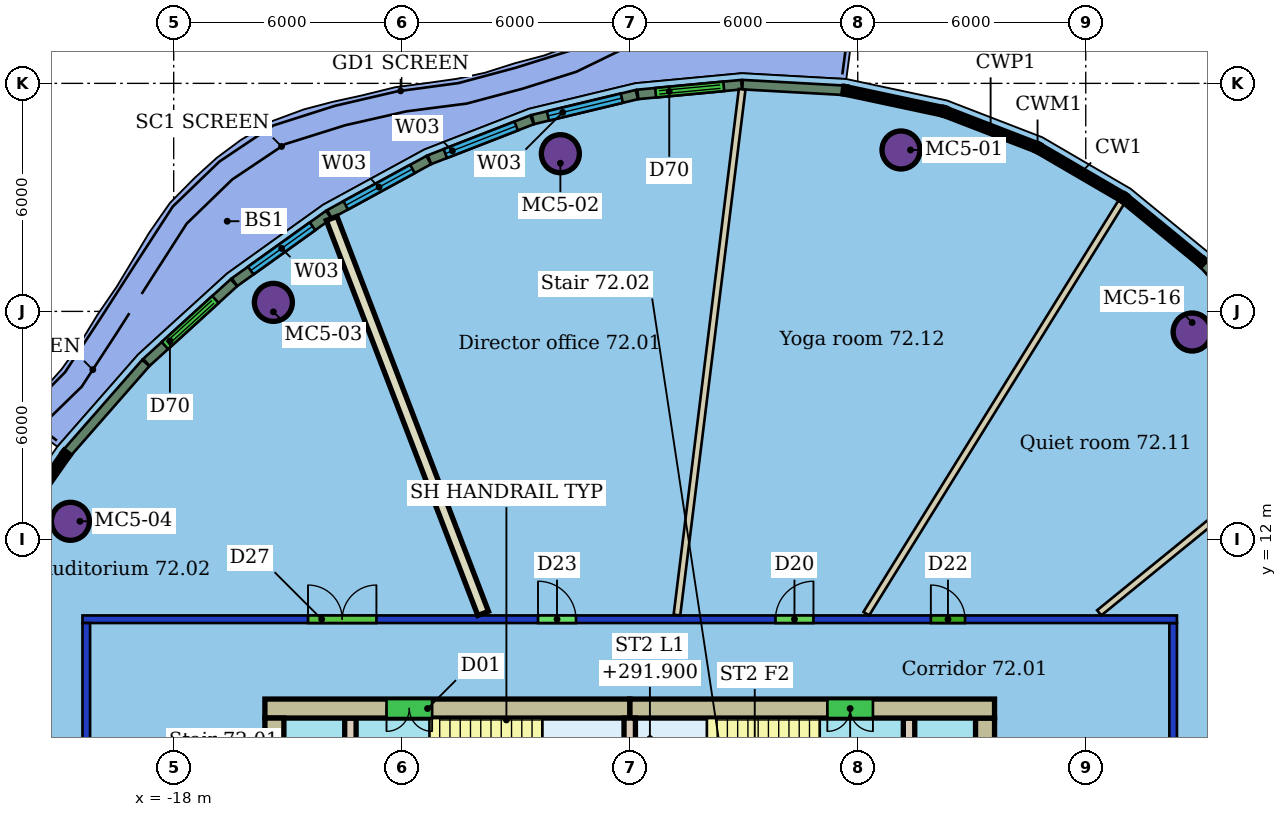
"""IFC4 building model, lengths in metres.
Left out: names, types, materials, properties, quantities, classifications, styles, units other than length and angle.
Written with IfcOpenShell. Run it as: python <this file> out.ifc"""

import sys

from ifc_helpers import new_model, si_unit, direction, frame, frame_2d, origin, origin_2d, place, context, subcontext, project, spatial, rectangle, hollow_circle, extrude, element, fill, save


model = new_model("IFC4")
c1 = context("Model", 3, precision=1e-05, world=origin(), true_north=direction((0.0, 1.0)))
c2 = subcontext(c1, "Body", "Model", "MODEL_VIEW")
j1 = project(units=[si_unit("LENGTHUNIT", "METRE"), si_unit("PLANEANGLEUNIT", "RADIAN")], contexts=[c1])
p1 = place(None, origin())
s1 = spatial("IfcSite", under=j1, at=p1, CompositionType="ELEMENT")
p2 = place(p1, origin())
s2 = spatial("IfcBuilding", under=s1, at=p2, CompositionType="ELEMENT")
p3 = place(p2, frame((0.0, 0.0, 290.1)))
s3 = spatial("IfcBuildingStorey", under=s2, at=p3, CompositionType="ELEMENT", Elevation=290.1)
for number, where, z_axis, x_axis in (
    (1, (1.138, 22.247, 0.0), (0.0, 0.0, 1.0), (1.0, 0.0, 0.0)),
    (2, (-7.825, 22.149, 0.0), (0.0, 0.0, 1.0), (1.0, 0.0, 0.0)),
    (3, (-15.377, 18.238, 0.0), (0.0, 0.0, 1.0), (1.0, 0.0, 0.0)),
    (4, (-20.718, 12.477, 0.0), (0.0, 0.0, 1.0), (1.0, 0.0, 0.0)),
    (5, (8.8, 17.457, 0.0), (0.0, 0.0, 1.0), (1.0, 0.0, 0.0)),
):
    element("IfcColumn", number, at=place(p3, frame(where, z_axis=z_axis, x_axis=x_axis)), inside=s3, PredefinedType="COLUMN", context=c2, shape_type="SweptSolid", body=[
        extrude(hollow_circle(Radius=0.5, WallThickness=0.04, at=origin_2d()), origin(), (0.0, 0.0, 1.0), 3.45),
    ])
p4 = place(p3, frame((-20.3, -9.8, 0.0), z_axis=(0.0, 0.0, 1.0), x_axis=(0.0, 1.0, 0.0)))
e6 = element("IfcWall", 6, at=p4, inside=s3, PredefinedType="PARTITIONING", context=c2, shape_type="SweptSolid", body=[
    extrude(rectangle(XDim=19.6, YDim=0.2, at=frame_2d((9.8, 0.0))), origin(), (0.0, 0.0, 1.0), 3.1),
])
p5 = place(p4, frame((8.396, 0.0, 0.0)))
e7 = element("IfcOpeningElement", 7, at=p5, cuts=e6, PredefinedType="OPENING", context=c2, shape_type="SweptSolid", body=[
    extrude(rectangle(XDim=1.5, YDim=2.1, at=frame_2d((0.75, 1.05))), frame((0.0, 0.11, 0.0), z_axis=(0.0, -1.0, 0.0), x_axis=(1.0, 0.0, 0.0)), (0.0, 0.0, 1.0), 0.22),
])
p6 = place(p4, frame((4.205, 0.0, 0.0)))
e8 = element("IfcOpeningElement", 8, at=p6, cuts=e6, PredefinedType="OPENING", context=c2, shape_type="SweptSolid", body=[
    extrude(rectangle(XDim=1.0, YDim=2.1, at=frame_2d((0.5, 1.05))), frame((0.0, 0.11, 0.0), z_axis=(0.0, -1.0, 0.0), x_axis=(1.0, 0.0, 0.0)), (0.0, 0.0, 1.0), 0.22),
])
p7 = place(p3, frame((-20.4, 9.9, 0.0), z_axis=(0.0, 0.0, 1.0), x_axis=(1.0, 0.0, 0.0)))
e9 = element("IfcWall", 9, at=p7, inside=s3, PredefinedType="PARTITIONING", context=c2, shape_type="SweptSolid", body=[
    extrude(rectangle(XDim=28.8, YDim=0.2, at=frame_2d((14.4, 0.0))), origin(), (0.0, 0.0, 1.0), 3.1),
])
p8 = place(p7, frame((11.987, 0.0, 0.0)))
e10 = element("IfcOpeningElement", 10, at=p8, cuts=e9, PredefinedType="OPENING", context=c2, shape_type="SweptSolid", body=[
    extrude(rectangle(XDim=1.0, YDim=2.4, at=frame_2d((0.5, 1.2))), frame((0.0, 0.11, 0.0), z_axis=(0.0, -1.0, 0.0), x_axis=(1.0, 0.0, 0.0)), (0.0, 0.0, 1.0), 0.22),
])
p9 = place(p7, frame((5.934, 0.0, 0.0)))
e11 = element("IfcOpeningElement", 11, at=p9, cuts=e9, PredefinedType="OPENING", context=c2, shape_type="SweptSolid", body=[
    extrude(rectangle(XDim=1.8, YDim=2.4, at=frame_2d((0.9, 1.2))), frame((0.0, 0.11, 0.0), z_axis=(0.0, -1.0, 0.0), x_axis=(1.0, 0.0, 0.0)), (0.0, 0.0, 1.0), 0.22),
])
p10 = place(p7, frame((22.324, 0.0, 0.0)))
e12 = element("IfcOpeningElement", 12, at=p10, cuts=e9, PredefinedType="OPENING", context=c2, shape_type="SweptSolid", body=[
    extrude(rectangle(XDim=0.9, YDim=2.1, at=frame_2d((0.45, 1.05))), frame((0.0, 0.11, 0.0), z_axis=(0.0, -1.0, 0.0), x_axis=(1.0, 0.0, 0.0)), (0.0, 0.0, 1.0), 0.22),
])
p11 = place(p7, frame((18.235, 0.0, 0.0)))
e13 = element("IfcOpeningElement", 13, at=p11, cuts=e9, PredefinedType="OPENING", context=c2, shape_type="SweptSolid", body=[
    extrude(rectangle(XDim=1.0, YDim=2.1, at=frame_2d((0.5, 1.05))), frame((0.0, 0.11, 0.0), z_axis=(0.0, -1.0, 0.0), x_axis=(1.0, 0.0, 0.0)), (0.0, 0.0, 1.0), 0.22),
])
p12 = place(p3, frame((8.3, 9.8, 0.0), z_axis=(0.0, 0.0, 1.0), x_axis=(0.0, -1.0, 0.0)))
e14 = element("IfcWall", 14, at=p12, inside=s3, PredefinedType="PARTITIONING", context=c2, shape_type="SweptSolid", body=[
    extrude(rectangle(XDim=19.6, YDim=0.2, at=frame_2d((9.8, 0.0))), origin(), (0.0, 0.0, 1.0), 3.1),
])
p13 = place(p12, frame((13.839, 0.0, 0.0)))
e15 = element("IfcOpeningElement", 15, at=p13, cuts=e14, PredefinedType="OPENING", context=c2, shape_type="SweptSolid", body=[
    extrude(rectangle(XDim=1.5, YDim=2.1, at=frame_2d((0.75, 1.05))), frame((0.0, 0.11, 0.0), z_axis=(0.0, -1.0, 0.0), x_axis=(1.0, 0.0, 0.0)), (0.0, 0.0, 1.0), 0.22),
])
p14 = place(p12, frame((8.55, 0.0, 0.0)))
e16 = element("IfcOpeningElement", 16, at=p14, cuts=e14, PredefinedType="OPENING", context=c2, shape_type="SweptSolid", body=[
    extrude(rectangle(XDim=0.9, YDim=2.1, at=frame_2d((0.45, 1.05))), frame((0.0, 0.11, 0.0), z_axis=(0.0, -1.0, 0.0), x_axis=(1.0, 0.0, 0.0)), (0.0, 0.0, 1.0), 0.22),
])
p15 = place(p12, frame((3.855, 0.0, 0.0)))
e17 = element("IfcOpeningElement", 17, at=p15, cuts=e14, PredefinedType="OPENING", context=c2, shape_type="SweptSolid", body=[
    extrude(rectangle(XDim=1.5, YDim=2.4, at=frame_2d((0.75, 1.2))), frame((0.0, 0.11, 0.0), z_axis=(0.0, -1.0, 0.0), x_axis=(1.0, 0.0, 0.0)), (0.0, 0.0, 1.0), 0.22),
])
p16 = place(p3, frame((-3.042, 23.842, 0.0), z_axis=(0.0, 0.0, 1.0), x_axis=(-0.123142143045, -0.99238904297, 0.0)))
e18 = element("IfcWall", 18, at=p16, inside=s3, PredefinedType="PARTITIONING", context=c2, shape_type="SweptSolid", body=[
    extrude(rectangle(XDim=13.938, YDim=0.175, at=frame_2d((6.969, 0.0))), origin(), (0.0, 0.0, 1.0), 3.45),
])
p17 = place(p3, frame((-13.844, 20.446, 0.0), z_axis=(0.0, 0.0, 1.0), x_axis=(0.358211704093, -0.933640388507, 0.0)))
e19 = element("IfcWall", 19, at=p17, inside=s3, PredefinedType="PARTITIONING", context=c2, shape_type="SweptSolid", body=[
    extrude(rectangle(XDim=11.13, YDim=0.3, at=frame_2d((5.565, 0.0))), origin(), (0.0, 0.0, 1.0), 3.45),
])
p18 = place(p3, frame((12.284, 14.9, 0.0), z_axis=(0.0, 0.0, 1.0), x_axis=(-0.775191568624, -0.631726231792, 0.0)))
e20 = element("IfcWall", 20, at=p18, inside=s3, PredefinedType="PARTITIONING", context=c2, shape_type="SweptSolid", body=[
    extrude(rectangle(XDim=7.649, YDim=0.175, at=frame_2d((3.825, 0.0))), origin(), (0.0, 0.0, 1.0), 3.45),
])
p19 = place(p3, frame((6.938, 20.878, 0.0), z_axis=(0.0, 0.0, 1.0), x_axis=(-0.526747010392, -0.850022109738, 0.0)))
e21 = element("IfcWall", 21, at=p19, inside=s3, PredefinedType="PARTITIONING", context=c2, shape_type="SweptSolid", body=[
    extrude(rectangle(XDim=12.743, YDim=0.175, at=frame_2d((6.371, 0.0))), origin(), (0.0, 0.0, 1.0), 3.45),
])
p20 = place(p3, frame((-0.396, 23.82, 0.0), z_axis=(0.0, 0.0, 1.0), x_axis=(-0.998463198624, 0.055418778352, 0.0)))
e22 = element("IfcWall", 22, at=p20, inside=s3, PredefinedType="SOLIDWALL", context=c2, shape_type="SweptSolid", body=[
    extrude(rectangle(XDim=2.639, YDim=0.25, at=frame_2d((1.319, 0.0))), origin(), (0.0, 0.0, 1.0), 3.15),
])
p21 = place(p3, frame((-3.057, 23.966, 0.0), z_axis=(0.0, 0.0, 1.0), x_axis=(-0.995626981475, -0.093417952019, 0.0)))
e23 = element("IfcWall", 23, at=p21, inside=s3, PredefinedType="SOLIDWALL", context=c2, shape_type="SweptSolid", body=[
    extrude(rectangle(XDim=2.741, YDim=0.25, at=frame_2d((1.371, 0.0))), origin(), (0.0, 0.0, 1.0), 3.15),
])
p22 = place(p21, frame((0.471, 0.0, 0.0)))
e24 = element("IfcOpeningElement", 24, at=p22, cuts=e23, PredefinedType="OPENING", context=c2, shape_type="SweptSolid", body=[
    extrude(rectangle(XDim=1.8, YDim=2.4, at=frame_2d((0.9, 1.2))), frame((0.0, 0.135, 0.0), z_axis=(0.0, -1.0, 0.0), x_axis=(1.0, 0.0, 0.0)), (0.0, 0.0, 1.0), 0.27),
])
p23 = place(p3, frame((-5.812, 23.706, 0.0), z_axis=(0.0, 0.0, 1.0), x_axis=(-0.972306924108, -0.233707606491, 0.0)))
e25 = element("IfcWall", 25, at=p23, inside=s3, PredefinedType="SOLIDWALL", context=c2, shape_type="SweptSolid", body=[
    extrude(rectangle(XDim=2.814, YDim=0.25, at=frame_2d((1.407, 0.0))), origin(), (0.0, 0.0, 1.0), 3.15),
])
p24 = place(p23, frame((0.407, 0.0, 0.9)))
e26 = element("IfcOpeningElement", 26, at=p24, cuts=e25, PredefinedType="OPENING", context=c2, shape_type="SweptSolid", body=[
    extrude(rectangle(XDim=2.0, YDim=2.1, at=frame_2d((1.0, 1.05))), frame((0.0, 0.135, 0.0), z_axis=(0.0, -1.0, 0.0), x_axis=(1.0, 0.0, 0.0)), (0.0, 0.0, 1.0), 0.27),
])
p25 = place(p3, frame((-8.572, 23.041, 0.0), z_axis=(0.0, 0.0, 1.0), x_axis=(-0.931927060947, -0.362645768035, 0.0)))
e27 = element("IfcWall", 27, at=p25, inside=s3, PredefinedType="SOLIDWALL", context=c2, shape_type="SweptSolid", body=[
    extrude(rectangle(XDim=2.894, YDim=0.25, at=frame_2d((1.447, 0.0))), origin(), (0.0, 0.0, 1.0), 3.15),
])
p26 = place(p25, frame((0.447, 0.0, 0.9)))
e28 = element("IfcOpeningElement", 28, at=p26, cuts=e27, PredefinedType="OPENING", context=c2, shape_type="SweptSolid", body=[
    extrude(rectangle(XDim=2.0, YDim=2.1, at=frame_2d((1.0, 1.05))), frame((0.0, 0.135, 0.0), z_axis=(0.0, -1.0, 0.0), x_axis=(1.0, 0.0, 0.0)), (0.0, 0.0, 1.0), 0.27),
])
p27 = place(p3, frame((-11.291, 21.981, 0.0), z_axis=(0.0, 0.0, 1.0), x_axis=(-0.877823384271, -0.478984452802, 0.0)))
e29 = element("IfcWall", 29, at=p27, inside=s3, PredefinedType="SOLIDWALL", context=c2, shape_type="SweptSolid", body=[
    extrude(rectangle(XDim=2.973, YDim=0.25, at=frame_2d((1.487, 0.0))), origin(), (0.0, 0.0, 1.0), 3.15),
])
p28 = place(p27, frame((0.487, 0.0, 0.9)))
e30 = element("IfcOpeningElement", 30, at=p28, cuts=e29, PredefinedType="OPENING", context=c2, shape_type="SweptSolid", body=[
    extrude(rectangle(XDim=2.0, YDim=2.1, at=frame_2d((1.0, 1.05))), frame((0.0, 0.135, 0.0), z_axis=(0.0, -1.0, 0.0), x_axis=(1.0, 0.0, 0.0)), (0.0, 0.0, 1.0), 0.27),
])
p29 = place(p3, frame((-13.92, 20.544, 0.0), z_axis=(0.0, 0.0, 1.0), x_axis=(-0.812910032744, -0.582389284469, 0.0)))
e31 = element("IfcWall", 31, at=p29, inside=s3, PredefinedType="SOLIDWALL", context=c2, shape_type="SweptSolid", body=[
    extrude(rectangle(XDim=3.048, YDim=0.25, at=frame_2d((1.524, 0.0))), origin(), (0.0, 0.0, 1.0), 3.15),
])
p30 = place(p29, frame((0.524, 0.0, 0.9)))
e32 = element("IfcOpeningElement", 32, at=p30, cuts=e31, PredefinedType="OPENING", context=c2, shape_type="SweptSolid", body=[
    extrude(rectangle(XDim=2.0, YDim=2.1, at=frame_2d((1.0, 1.05))), frame((0.0, 0.135, 0.0), z_axis=(0.0, -1.0, 0.0), x_axis=(1.0, 0.0, 0.0)), (0.0, 0.0, 1.0), 0.27),
])
p31 = place(p3, frame((-16.416, 18.755, 0.0), z_axis=(0.0, 0.0, 1.0), x_axis=(-0.739421840392, -0.673242409502, 0.0)))
e33 = element("IfcWall", 33, at=p31, inside=s3, PredefinedType="SOLIDWALL", context=c2, shape_type="SweptSolid", body=[
    extrude(rectangle(XDim=3.114, YDim=0.25, at=frame_2d((1.557, 0.0))), origin(), (0.0, 0.0, 1.0), 3.15),
])
p32 = place(p31, frame((0.657, 0.0, 0.0)))
e34 = element("IfcOpeningElement", 34, at=p32, cuts=e33, PredefinedType="OPENING", context=c2, shape_type="SweptSolid", body=[
    extrude(rectangle(XDim=1.8, YDim=2.4, at=frame_2d((0.9, 1.2))), frame((0.0, 0.135, 0.0), z_axis=(0.0, -1.0, 0.0), x_axis=(1.0, 0.0, 0.0)), (0.0, 0.0, 1.0), 0.27),
])
p33 = place(p3, frame((-18.733, 16.643, 0.0), z_axis=(0.0, 0.0, 1.0), x_axis=(-0.658963977512, -0.752174498598, 0.0)))
e35 = element("IfcWall", 35, at=p33, inside=s3, PredefinedType="SOLIDWALL", context=c2, shape_type="SweptSolid", body=[
    extrude(rectangle(XDim=3.122, YDim=0.25, at=frame_2d((1.561, 0.0))), origin(), (0.0, 0.0, 1.0), 3.15),
])
p34 = place(p3, frame((10.866, 17.285, 0.0), z_axis=(0.0, 0.0, 1.0), x_axis=(-0.666789450608, 0.745246152997, 0.0)))
e36 = element("IfcWall", 36, at=p34, inside=s3, PredefinedType="SOLIDWALL", context=c2, shape_type="SweptSolid", body=[
    extrude(rectangle(XDim=2.639, YDim=0.25, at=frame_2d((1.319, 0.0))), origin(), (0.0, 0.0, 1.0), 3.15),
])
p35 = place(p3, frame((3.6, 7.55, 0.0), z_axis=(0.0, 0.0, 1.0), x_axis=(-1.0, 0.0, 0.0)))
e37 = element("IfcWall", 37, at=p35, inside=s3, PredefinedType="SHEAR", context=c2, shape_type="SweptSolid", body=[
    extrude(rectangle(XDim=9.6, YDim=0.5, at=frame_2d((4.8, 0.0))), origin(), (0.0, 0.0, 1.0), 3.3),
])
p36 = place(p35, frame((3.2, 0.0, 0.0)))
e38 = element("IfcOpeningElement", 38, at=p36, cuts=e37, PredefinedType="OPENING", context=c2, shape_type="SweptSolid", body=[
    extrude(rectangle(XDim=1.2, YDim=2.1, at=frame_2d((0.6, 1.05))), frame((0.0, 0.26, 0.0), z_axis=(0.0, -1.0, 0.0), x_axis=(1.0, 0.0, 0.0)), (0.0, 0.0, 1.0), 0.52),
])
p37 = place(p3, frame((-6.0, 7.55, 0.0), z_axis=(0.0, 0.0, 1.0), x_axis=(-1.0, 0.0, 0.0)))
e39 = element("IfcWall", 39, at=p37, inside=s3, PredefinedType="SHEAR", context=c2, shape_type="SweptSolid", body=[
    extrude(rectangle(XDim=9.6, YDim=0.5, at=frame_2d((4.8, 0.0))), origin(), (0.0, 0.0, 1.0), 3.3),
])
p38 = place(p37, frame((5.2, 0.0, 0.0)))
e40 = element("IfcOpeningElement", 40, at=p38, cuts=e39, PredefinedType="OPENING", context=c2, shape_type="SweptSolid", body=[
    extrude(rectangle(XDim=1.2, YDim=2.1, at=frame_2d((0.6, 1.05))), frame((0.0, 0.26, 0.0), z_axis=(0.0, -1.0, 0.0), x_axis=(1.0, 0.0, 0.0)), (0.0, 0.0, 1.0), 0.52),
])
p39 = place(p3, frame((-15.35, 7.3, 0.0), z_axis=(0.0, 0.0, 1.0), x_axis=(0.0, -1.0, 0.0)))
e41 = element("IfcWall", 41, at=p39, inside=s3, PredefinedType="SHEAR", context=c2, shape_type="SweptSolid", body=[
    extrude(rectangle(XDim=14.6, YDim=0.5, at=frame_2d((7.3, 0.0))), origin(), (0.0, 0.0, 1.0), 3.3),
])
p40 = place(p39, frame((10.6, 0.0, 0.0)))
e42 = element("IfcOpeningElement", 42, at=p40, cuts=e41, PredefinedType="OPENING", context=c2, shape_type="SweptSolid", body=[
    extrude(rectangle(XDim=1.2, YDim=2.1, at=frame_2d((0.6, 1.05))), frame((0.0, 0.26, 0.0), z_axis=(0.0, -1.0, 0.0), x_axis=(1.0, 0.0, 0.0)), (0.0, 0.0, 1.0), 0.52),
])
p41 = place(p39, frame((2.8, 0.0, 0.0)))
e43 = element("IfcOpeningElement", 43, at=p41, cuts=e41, PredefinedType="OPENING", context=c2, shape_type="SweptSolid", body=[
    extrude(rectangle(XDim=1.2, YDim=2.1, at=frame_2d((0.6, 1.05))), frame((0.0, 0.26, 0.0), z_axis=(0.0, -1.0, 0.0), x_axis=(1.0, 0.0, 0.0)), (0.0, 0.0, 1.0), 0.52),
])
p42 = place(p3, frame((3.35, -7.3, 0.0), z_axis=(0.0, 0.0, 1.0), x_axis=(0.0, 1.0, 0.0)))
e44 = element("IfcWall", 44, at=p42, inside=s3, PredefinedType="SHEAR", context=c2, shape_type="SweptSolid", body=[
    extrude(rectangle(XDim=14.6, YDim=0.5, at=frame_2d((7.3, 0.0))), origin(), (0.0, 0.0, 1.0), 3.3),
])
p43 = place(p42, frame((2.8, 0.0, 0.0)))
e45 = element("IfcOpeningElement", 45, at=p43, cuts=e44, PredefinedType="OPENING", context=c2, shape_type="SweptSolid", body=[
    extrude(rectangle(XDim=1.2, YDim=2.1, at=frame_2d((0.6, 1.05))), frame((0.0, 0.26, 0.0), z_axis=(0.0, -1.0, 0.0), x_axis=(1.0, 0.0, 0.0)), (0.0, 0.0, 1.0), 0.52),
])
p44 = place(p42, frame((10.6, 0.0, 0.0)))
e46 = element("IfcOpeningElement", 46, at=p44, cuts=e44, PredefinedType="OPENING", context=c2, shape_type="SweptSolid", body=[
    extrude(rectangle(XDim=1.2, YDim=2.1, at=frame_2d((0.6, 1.05))), frame((0.0, 0.26, 0.0), z_axis=(0.0, -1.0, 0.0), x_axis=(1.0, 0.0, 0.0)), (0.0, 0.0, 1.0), 0.52),
])
p45 = place(p3, frame((-13.35, 7.3, 0.0), z_axis=(0.0, 0.0, 1.0), x_axis=(0.0, -1.0, 0.0)))
e47 = element("IfcWall", 47, at=p45, inside=s3, PredefinedType="SHEAR", context=c2, shape_type="SweptSolid", body=[
    extrude(rectangle(XDim=14.6, YDim=0.3, at=frame_2d((7.3, 0.0))), origin(), (0.0, 0.0, 1.0), 3.3),
])
p46 = place(p45, frame((6.55, 0.0, 0.0)))
e48 = element("IfcOpeningElement", 48, at=p46, cuts=e47, PredefinedType="OPENING", context=c2, shape_type="SweptSolid", body=[
    extrude(rectangle(XDim=1.5, YDim=2.1, at=frame_2d((0.75, 1.05))), frame((0.0, 0.16, 0.0), z_axis=(0.0, -1.0, 0.0), x_axis=(1.0, 0.0, 0.0)), (0.0, 0.0, 1.0), 0.32),
])
p47 = place(p3, frame((1.35, -7.3, 0.0), z_axis=(0.0, 0.0, 1.0), x_axis=(0.0, 1.0, 0.0)))
e49 = element("IfcWall", 49, at=p47, inside=s3, PredefinedType="SHEAR", context=c2, shape_type="SweptSolid", body=[
    extrude(rectangle(XDim=14.6, YDim=0.3, at=frame_2d((7.3, 0.0))), origin(), (0.0, 0.0, 1.0), 3.3),
])
p48 = place(p47, frame((1.21, 0.0, 0.0)))
e50 = element("IfcOpeningElement", 50, at=p48, cuts=e49, PredefinedType="OPENING", context=c2, shape_type="SweptSolid", body=[
    extrude(rectangle(XDim=1.0, YDim=2.1, at=frame_2d((0.5, 1.05))), frame((0.0, 0.16, 0.0), z_axis=(0.0, -1.0, 0.0), x_axis=(1.0, 0.0, 0.0)), (0.0, 0.0, 1.0), 0.32),
])
p49 = place(p47, frame((6.55, 0.0, 0.0)))
e51 = element("IfcOpeningElement", 51, at=p49, cuts=e49, PredefinedType="OPENING", context=c2, shape_type="SweptSolid", body=[
    extrude(rectangle(XDim=1.5, YDim=2.1, at=frame_2d((0.75, 1.05))), frame((0.0, 0.16, 0.0), z_axis=(0.0, -1.0, 0.0), x_axis=(1.0, 0.0, 0.0)), (0.0, 0.0, 1.0), 0.32),
])
p50 = place(p3, frame((-6.0, 3.88, 0.0), z_axis=(0.0, 0.0, 1.0), x_axis=(0.0, 1.0, 0.0)))
e52 = element("IfcWall", 52, at=p50, inside=s3, PredefinedType="SHEAR", context=c2, shape_type="SweptSolid", body=[
    extrude(rectangle(XDim=3.42, YDim=0.3, at=frame_2d((1.71, 0.0))), origin(), (0.0, 0.0, 1.0), 3.3),
])
p51 = place(p8, origin())
e53 = element("IfcDoor", 53, at=p51, inside=s3, OperationType="SINGLE_SWING_LEFT", PredefinedType="DOOR", context=c2, shape_type="SweptSolid", body=[
    extrude(rectangle(XDim=1.0, YDim=2.4, at=frame_2d((0.5, 1.2))), frame((0.0, 0.025, 0.0), z_axis=(0.0, -1.0, 0.0), x_axis=(1.0, 0.0, 0.0)), (0.0, 0.0, 1.0), 0.05),
])
fill(e10, e53)
p52 = place(p9, origin())
e54 = element("IfcDoor", 54, at=p52, inside=s3, OperationType="DOUBLE_DOOR_SINGLE_SWING", PredefinedType="DOOR", context=c2, shape_type="SweptSolid", body=[
    extrude(rectangle(XDim=1.8, YDim=2.4, at=frame_2d((0.9, 1.2))), frame((0.0, 0.025, 0.0), z_axis=(0.0, -1.0, 0.0), x_axis=(1.0, 0.0, 0.0)), (0.0, 0.0, 1.0), 0.05),
])
fill(e11, e54)
p53 = place(p10, origin())
e55 = element("IfcDoor", 55, at=p53, inside=s3, OperationType="SINGLE_SWING_LEFT", PredefinedType="DOOR", context=c2, shape_type="SweptSolid", body=[
    extrude(rectangle(XDim=0.9, YDim=2.1, at=frame_2d((0.45, 1.05))), frame((0.0, 0.025, 0.0), z_axis=(0.0, -1.0, 0.0), x_axis=(1.0, 0.0, 0.0)), (0.0, 0.0, 1.0), 0.05),
])
fill(e12, e55)
p54 = place(p11, origin())
e56 = element("IfcDoor", 56, at=p54, inside=s3, OperationType="SINGLE_SWING_RIGHT", PredefinedType="DOOR", context=c2, shape_type="SweptSolid", body=[
    extrude(rectangle(XDim=1.0, YDim=2.1, at=frame_2d((0.5, 1.05))), frame((0.0, 0.025, 0.0), z_axis=(0.0, -1.0, 0.0), x_axis=(1.0, 0.0, 0.0)), (0.0, 0.0, 1.0), 0.05),
])
fill(e13, e56)
p55 = place(p22, origin())
e57 = element("IfcDoor", 57, at=p55, inside=s3, OperationType="DOUBLE_DOOR_SLIDING", PredefinedType="DOOR", context=c2, shape_type="SweptSolid", body=[
    extrude(rectangle(XDim=1.8, YDim=2.4, at=frame_2d((0.9, 1.2))), frame((0.0, 0.025, 0.0), z_axis=(0.0, -1.0, 0.0), x_axis=(1.0, 0.0, 0.0)), (0.0, 0.0, 1.0), 0.05),
])
fill(e24, e57)
p56 = place(p24, origin())
e58 = element("IfcWindow", 58, at=p56, inside=s3, PartitioningType="SINGLE_PANEL", PredefinedType="WINDOW", context=c2, shape_type="SweptSolid", body=[
    extrude(rectangle(XDim=2.0, YDim=2.1, at=frame_2d((1.0, 1.05))), frame((0.0, 0.03, 0.0), z_axis=(0.0, -1.0, 0.0), x_axis=(1.0, 0.0, 0.0)), (0.0, 0.0, 1.0), 0.06),
])
fill(e26, e58)
p57 = place(p26, origin())
e59 = element("IfcWindow", 59, at=p57, inside=s3, PartitioningType="SINGLE_PANEL", PredefinedType="WINDOW", context=c2, shape_type="SweptSolid", body=[
    extrude(rectangle(XDim=2.0, YDim=2.1, at=frame_2d((1.0, 1.05))), frame((0.0, 0.03, 0.0), z_axis=(0.0, -1.0, 0.0), x_axis=(1.0, 0.0, 0.0)), (0.0, 0.0, 1.0), 0.06),
])
fill(e28, e59)
p58 = place(p28, origin())
e60 = element("IfcWindow", 60, at=p58, inside=s3, PartitioningType="SINGLE_PANEL", PredefinedType="WINDOW", context=c2, shape_type="SweptSolid", body=[
    extrude(rectangle(XDim=2.0, YDim=2.1, at=frame_2d((1.0, 1.05))), frame((0.0, 0.03, 0.0), z_axis=(0.0, -1.0, 0.0), x_axis=(1.0, 0.0, 0.0)), (0.0, 0.0, 1.0), 0.06),
])
fill(e30, e60)
p59 = place(p30, origin())
e61 = element("IfcWindow", 61, at=p59, inside=s3, PartitioningType="SINGLE_PANEL", PredefinedType="WINDOW", context=c2, shape_type="SweptSolid", body=[
    extrude(rectangle(XDim=2.0, YDim=2.1, at=frame_2d((1.0, 1.05))), frame((0.0, 0.03, 0.0), z_axis=(0.0, -1.0, 0.0), x_axis=(1.0, 0.0, 0.0)), (0.0, 0.0, 1.0), 0.06),
])
fill(e32, e61)
p60 = place(p32, origin())
e62 = element("IfcDoor", 62, at=p60, inside=s3, OperationType="DOUBLE_DOOR_SLIDING", PredefinedType="DOOR", context=c2, shape_type="SweptSolid", body=[
    extrude(rectangle(XDim=1.8, YDim=2.4, at=frame_2d((0.9, 1.2))), frame((0.0, 0.025, 0.0), z_axis=(0.0, -1.0, 0.0), x_axis=(1.0, 0.0, 0.0)), (0.0, 0.0, 1.0), 0.05),
])
fill(e34, e62)
p61 = place(p36, origin())
e63 = element("IfcDoor", 63, at=p61, inside=s3, OperationType="DOUBLE_DOOR_SINGLE_SWING", PredefinedType="NOTDEFINED", context=c2, shape_type="SweptSolid", body=[
    extrude(rectangle(XDim=1.2, YDim=2.1, at=frame_2d((0.6, 1.05))), frame((0.0, 0.025, 0.0), z_axis=(0.0, -1.0, 0.0), x_axis=(1.0, 0.0, 0.0)), (0.0, 0.0, 1.0), 0.05),
])
fill(e38, e63)
p62 = place(p38, origin())
e64 = element("IfcDoor", 64, at=p62, inside=s3, OperationType="DOUBLE_DOOR_SINGLE_SWING", PredefinedType="NOTDEFINED", context=c2, shape_type="SweptSolid", body=[
    extrude(rectangle(XDim=1.2, YDim=2.1, at=frame_2d((0.6, 1.05))), frame((0.0, 0.025, 0.0), z_axis=(0.0, -1.0, 0.0), x_axis=(1.0, 0.0, 0.0)), (0.0, 0.0, 1.0), 0.05),
])
fill(e40, e64)
save(model, sys.argv[1])
